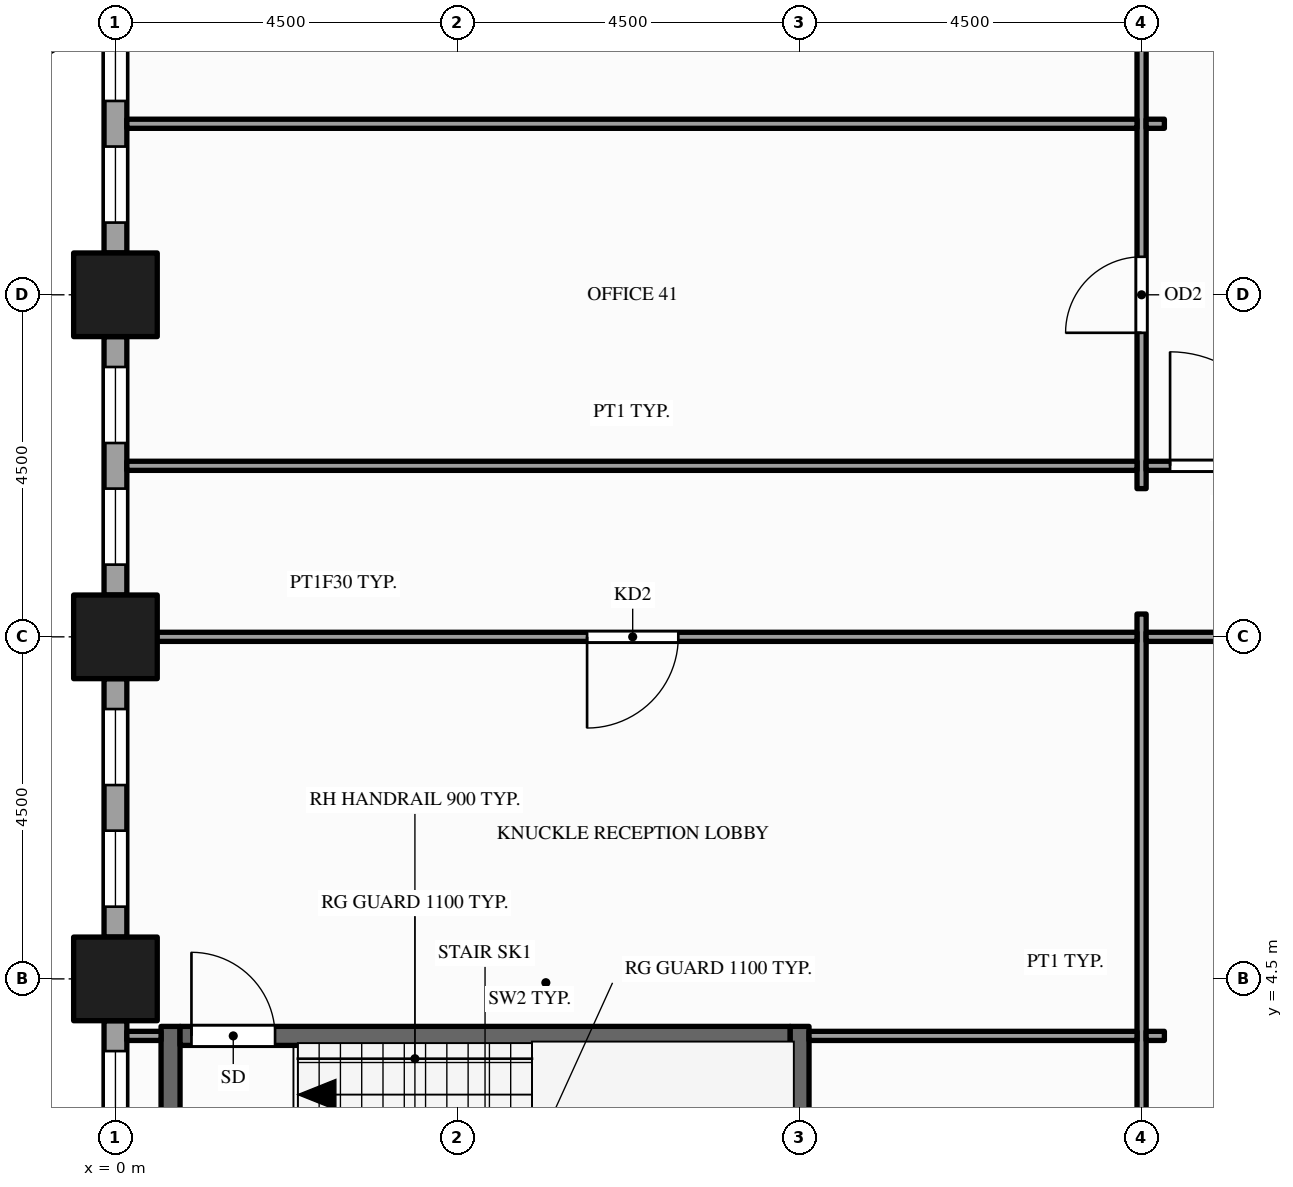
"""IFC4 building model, lengths in metres.
Left out: names, types, materials, properties, quantities, classifications, styles, units other than length and angle.
Written with IfcOpenShell. Run it as: python <this file> out.ifc"""

import sys

from ifc_helpers import new_model, si_unit, direction, frame, frame_2d, origin, origin_2d, place, context, subcontext, project, spatial, rectangle, hollow_rectangle, extrude, element, fill, save


model = new_model("IFC4")
c1 = context("Model", 3, precision=1e-05, world=origin(), true_north=direction((0.0, 1.0)))
c2 = subcontext(c1, "Body", "Model", "MODEL_VIEW")
j1 = project(units=[si_unit("LENGTHUNIT", "METRE"), si_unit("PLANEANGLEUNIT", "RADIAN")], contexts=[c1])
p1 = place(None, origin())
s1 = spatial("IfcSite", under=j1, at=p1, CompositionType="ELEMENT")
p2 = place(p1, origin())
s2 = spatial("IfcBuilding", under=s1, at=p2, CompositionType="ELEMENT")
p3 = place(p2, frame((0.0, 0.0, 61.0)))
s3 = spatial("IfcBuildingStorey", under=s2, at=p3, CompositionType="ELEMENT", Elevation=61.0)
for number, where, z_axis, x_axis in (
    (1, (0.0, 4.5, -0.15), (0.0, 0.0, 1.0), (1.0, 0.0, 0.0)),
    (2, (0.0, 9.0, -0.15), (0.0, 0.0, 1.0), (1.0, 0.0, 0.0)),
    (3, (0.0, 13.5, -0.15), (0.0, 0.0, 1.0), (1.0, 0.0, 0.0)),
):
    element("IfcColumn", number, at=place(p3, frame(where, z_axis=z_axis, x_axis=x_axis)), inside=s3, PredefinedType="COLUMN", context=c2, shape_type="SweptSolid", body=[
        extrude(hollow_rectangle(XDim=1.1, YDim=1.1, WallThickness=0.06, at=origin_2d()), origin(), (0.0, 0.0, 1.0), 4.0),
    ])
p4 = place(p3, frame((0.0, 17.45, 0.0), z_axis=(0.0, 0.0, 1.0), x_axis=(0.0, -1.0, 0.0)))
e4 = element("IfcWall", 4, at=p4, inside=s3, PredefinedType="STANDARD", context=c2, shape_type="SweptSolid", body=[
    extrude(rectangle(XDim=3.4, YDim=0.3, at=frame_2d((1.7, 0.0))), origin(), (0.0, 0.0, 1.0), 3.144),
])
p5 = place(p4, frame((0.4, 0.0, 0.9)))
e5 = element("IfcOpeningElement", 5, at=p5, cuts=e4, PredefinedType="OPENING", context=c2, shape_type="SweptSolid", body=[
    extrude(rectangle(XDim=1.0, YDim=2.0, at=frame_2d((0.5, 1.0))), frame((0.0, 0.16, 0.0), z_axis=(0.0, -1.0, 0.0), x_axis=(1.0, 0.0, 0.0)), (0.0, 0.0, 1.0), 0.32),
])
p6 = place(p4, frame((2.0, 0.0, 0.9)))
e6 = element("IfcOpeningElement", 6, at=p6, cuts=e4, PredefinedType="OPENING", context=c2, shape_type="SweptSolid", body=[
    extrude(rectangle(XDim=1.0, YDim=2.0, at=frame_2d((0.5, 1.0))), frame((0.0, 0.16, 0.0), z_axis=(0.0, -1.0, 0.0), x_axis=(1.0, 0.0, 0.0)), (0.0, 0.0, 1.0), 0.32),
])
p7 = place(p3, frame((0.0, 12.95, 0.0), z_axis=(0.0, 0.0, 1.0), x_axis=(0.0, -1.0, 0.0)))
e7 = element("IfcWall", 7, at=p7, inside=s3, PredefinedType="STANDARD", context=c2, shape_type="SweptSolid", body=[
    extrude(rectangle(XDim=3.4, YDim=0.3, at=frame_2d((1.7, 0.0))), origin(), (0.0, 0.0, 1.0), 3.144),
])
p8 = place(p7, frame((0.4, 0.0, 0.9)))
e8 = element("IfcOpeningElement", 8, at=p8, cuts=e7, PredefinedType="OPENING", context=c2, shape_type="SweptSolid", body=[
    extrude(rectangle(XDim=1.0, YDim=2.0, at=frame_2d((0.5, 1.0))), frame((0.0, 0.16, 0.0), z_axis=(0.0, -1.0, 0.0), x_axis=(1.0, 0.0, 0.0)), (0.0, 0.0, 1.0), 0.32),
])
p9 = place(p7, frame((2.0, 0.0, 0.9)))
e9 = element("IfcOpeningElement", 9, at=p9, cuts=e7, PredefinedType="OPENING", context=c2, shape_type="SweptSolid", body=[
    extrude(rectangle(XDim=1.0, YDim=2.0, at=frame_2d((0.5, 1.0))), frame((0.0, 0.16, 0.0), z_axis=(0.0, -1.0, 0.0), x_axis=(1.0, 0.0, 0.0)), (0.0, 0.0, 1.0), 0.32),
])
p10 = place(p3, frame((0.0, 8.45, 0.0), z_axis=(0.0, 0.0, 1.0), x_axis=(0.0, -1.0, 0.0)))
e10 = element("IfcWall", 10, at=p10, inside=s3, PredefinedType="STANDARD", context=c2, shape_type="SweptSolid", body=[
    extrude(rectangle(XDim=3.4, YDim=0.3, at=frame_2d((1.7, 0.0))), origin(), (0.0, 0.0, 1.0), 3.144),
])
p11 = place(p10, frame((0.4, 0.0, 0.9)))
e11 = element("IfcOpeningElement", 11, at=p11, cuts=e10, PredefinedType="OPENING", context=c2, shape_type="SweptSolid", body=[
    extrude(rectangle(XDim=1.0, YDim=2.0, at=frame_2d((0.5, 1.0))), frame((0.0, 0.16, 0.0), z_axis=(0.0, -1.0, 0.0), x_axis=(1.0, 0.0, 0.0)), (0.0, 0.0, 1.0), 0.32),
])
p12 = place(p10, frame((2.0, 0.0, 0.9)))
e12 = element("IfcOpeningElement", 12, at=p12, cuts=e10, PredefinedType="OPENING", context=c2, shape_type="SweptSolid", body=[
    extrude(rectangle(XDim=1.0, YDim=2.0, at=frame_2d((0.5, 1.0))), frame((0.0, 0.16, 0.0), z_axis=(0.0, -1.0, 0.0), x_axis=(1.0, 0.0, 0.0)), (0.0, 0.0, 1.0), 0.32),
])
p13 = place(p3, frame((0.0, 3.95, 0.0), z_axis=(0.0, 0.0, 1.0), x_axis=(0.0, -1.0, 0.0)))
e13 = element("IfcWall", 13, at=p13, inside=s3, PredefinedType="STANDARD", context=c2, shape_type="SweptSolid", body=[
    extrude(rectangle(XDim=3.4, YDim=0.3, at=frame_2d((1.7, 0.0))), origin(), (0.0, 0.0, 1.0), 3.144),
])
p14 = place(p13, frame((0.4, 0.0, 0.9)))
e14 = element("IfcOpeningElement", 14, at=p14, cuts=e13, PredefinedType="OPENING", context=c2, shape_type="SweptSolid", body=[
    extrude(rectangle(XDim=1.0, YDim=2.0, at=frame_2d((0.5, 1.0))), frame((0.0, 0.16, 0.0), z_axis=(0.0, -1.0, 0.0), x_axis=(1.0, 0.0, 0.0)), (0.0, 0.0, 1.0), 0.32),
])
p15 = place(p13, frame((2.0, 0.0, 0.9)))
e15 = element("IfcOpeningElement", 15, at=p15, cuts=e13, PredefinedType="OPENING", context=c2, shape_type="SweptSolid", body=[
    extrude(rectangle(XDim=1.0, YDim=2.0, at=frame_2d((0.5, 1.0))), frame((0.0, 0.16, 0.0), z_axis=(0.0, -1.0, 0.0), x_axis=(1.0, 0.0, 0.0)), (0.0, 0.0, 1.0), 0.32),
])
p16 = place(p3, frame((0.725, 0.6, 0.0), z_axis=(0.0, 0.0, 1.0), x_axis=(0.0, 1.0, 0.0)))
e16 = element("IfcWall", 16, at=p16, inside=s3, PredefinedType="SHEAR", context=c2, shape_type="SweptSolid", body=[
    extrude(rectangle(XDim=3.275, YDim=0.25, at=frame_2d((1.637, 0.0))), origin(), (0.0, 0.0, 1.0), 3.85),
])
p17 = place(p3, frame((9.0, 0.55, 0.0), z_axis=(0.0, 0.0, 1.0), x_axis=(0.0, 1.0, 0.0)))
e17 = element("IfcWall", 17, at=p17, inside=s3, PredefinedType="SHEAR", context=c2, shape_type="SweptSolid", body=[
    extrude(rectangle(XDim=3.325, YDim=0.25, at=frame_2d((1.663, 0.0))), origin(), (0.0, 0.0, 1.0), 3.85),
])
p18 = place(p3, frame((13.5, 0.15, 0.0), z_axis=(0.0, 0.0, 1.0), x_axis=(0.0, 1.0, 0.0)))
e18 = element("IfcWall", 18, at=p18, inside=s3, PredefinedType="PARTITIONING", context=c2, shape_type="SweptSolid", body=[
    extrude(rectangle(XDim=9.15, YDim=0.12, at=frame_2d((4.575, 0.0))), origin(), (0.0, 0.0, 1.0), 2.938),
])
p19 = place(p3, frame((13.5, 10.95, 0.0), z_axis=(0.0, 0.0, 1.0), x_axis=(0.0, 1.0, 0.0)))
e19 = element("IfcWall", 19, at=p19, inside=s3, PredefinedType="PARTITIONING", context=c2, shape_type="SweptSolid", body=[
    extrude(rectangle(XDim=20.85, YDim=0.12, at=frame_2d((10.425, 0.0))), origin(), (0.0, 0.0, 1.0), 2.6),
])
p20 = place(p19, frame((2.05, 0.0, 0.0)))
e20 = element("IfcOpeningElement", 20, at=p20, cuts=e19, PredefinedType="OPENING", context=c2, shape_type="SweptSolid", body=[
    extrude(rectangle(XDim=1.0, YDim=2.1, at=frame_2d((0.5, 1.05))), frame((0.0, 0.07, 0.0), z_axis=(0.0, -1.0, 0.0), x_axis=(1.0, 0.0, 0.0)), (0.0, 0.0, 1.0), 0.14),
])
p21 = place(p19, frame((6.55, 0.0, 0.0)))
e21 = element("IfcOpeningElement", 21, at=p21, cuts=e19, PredefinedType="OPENING", context=c2, shape_type="SweptSolid", body=[
    extrude(rectangle(XDim=1.0, YDim=2.1, at=frame_2d((0.5, 1.05))), frame((0.0, 0.07, 0.0), z_axis=(0.0, -1.0, 0.0), x_axis=(1.0, 0.0, 0.0)), (0.0, 0.0, 1.0), 0.14),
])
p22 = place(p19, frame((11.805, 0.0, 0.0)))
e22 = element("IfcOpeningElement", 22, at=p22, cuts=e19, PredefinedType="OPENING", context=c2, shape_type="SweptSolid", body=[
    extrude(rectangle(XDim=1.8, YDim=2.1, at=frame_2d((0.9, 1.05))), frame((0.0, 0.07, 0.0), z_axis=(0.0, -1.0, 0.0), x_axis=(1.0, 0.0, 0.0)), (0.0, 0.0, 1.0), 0.14),
])
p23 = place(p3, frame((0.15, 3.75, 0.0), z_axis=(0.0, 0.0, 1.0), x_axis=(1.0, 0.0, 0.0)))
e23 = element("IfcWall", 23, at=p23, inside=s3, PredefinedType="PARTITIONING", context=c2, shape_type="SweptSolid", body=[
    extrude(rectangle(XDim=0.45, YDim=0.12, at=frame_2d((0.225, 0.0))), origin(), (0.0, 0.0, 1.0), 3.144),
])
p24 = place(p3, frame((0.85, 3.75, 0.0), z_axis=(0.0, 0.0, 1.0), x_axis=(1.0, 0.0, 0.0)))
e24 = element("IfcWall", 24, at=p24, inside=s3, PredefinedType="SHEAR", context=c2, shape_type="SweptSolid", body=[
    extrude(rectangle(XDim=8.025, YDim=0.25, at=frame_2d((4.012, 0.0))), origin(), (0.0, 0.0, 1.0), 3.85),
])
p25 = place(p24, frame((0.15, 0.0, 0.0)))
e25 = element("IfcOpeningElement", 25, at=p25, cuts=e24, PredefinedType="OPENING", context=c2, shape_type="SweptSolid", body=[
    extrude(rectangle(XDim=1.1, YDim=2.1, at=frame_2d((0.55, 1.05))), frame((0.0, 0.135, 0.0), z_axis=(0.0, -1.0, 0.0), x_axis=(1.0, 0.0, 0.0)), (0.0, 0.0, 1.0), 0.27),
])
p26 = place(p3, frame((9.125, 3.75, 0.0), z_axis=(0.0, 0.0, 1.0), x_axis=(1.0, 0.0, 0.0)))
e26 = element("IfcWall", 26, at=p26, inside=s3, PredefinedType="PARTITIONING", context=c2, shape_type="SweptSolid", body=[
    extrude(rectangle(XDim=4.315, YDim=0.12, at=frame_2d((2.157, 0.0))), origin(), (0.0, 0.0, 1.0), 2.938),
])
p27 = place(p3, frame((13.56, 3.75, 0.0), z_axis=(0.0, 0.0, 1.0), x_axis=(1.0, 0.0, 0.0)))
e27 = element("IfcWall", 27, at=p27, inside=s3, PredefinedType="PARTITIONING", context=c2, shape_type="SweptSolid", body=[
    extrude(rectangle(XDim=0.24, YDim=0.12, at=frame_2d((0.12, 0.0))), origin(), (0.0, 0.0, 1.0), 2.938),
])
p28 = place(p3, frame((0.15, 9.0, 0.0), z_axis=(0.0, 0.0, 1.0), x_axis=(1.0, 0.0, 0.0)))
e28 = element("IfcWall", 28, at=p28, inside=s3, PredefinedType="PARTITIONING", context=c2, shape_type="SweptSolid", body=[
    extrude(rectangle(XDim=13.29, YDim=0.12, at=frame_2d((6.645, 0.0))), origin(), (0.0, 0.0, 1.0), 2.938),
])
p29 = place(p28, frame((6.055, 0.0, 0.0)))
e29 = element("IfcOpeningElement", 29, at=p29, cuts=e28, PredefinedType="OPENING", context=c2, shape_type="SweptSolid", body=[
    extrude(rectangle(XDim=1.2, YDim=2.1, at=frame_2d((0.6, 1.05))), frame((0.0, 0.07, 0.0), z_axis=(0.0, -1.0, 0.0), x_axis=(1.0, 0.0, 0.0)), (0.0, 0.0, 1.0), 0.14),
])
p30 = place(p3, frame((13.56, 9.0, 0.0), z_axis=(0.0, 0.0, 1.0), x_axis=(1.0, 0.0, 0.0)))
e30 = element("IfcWall", 30, at=p30, inside=s3, PredefinedType="PARTITIONING", context=c2, shape_type="SweptSolid", body=[
    extrude(rectangle(XDim=17.88, YDim=0.12, at=frame_2d((8.94, 0.0))), origin(), (0.0, 0.0, 1.0), 2.938),
])
p31 = place(p30, frame((8.04, 0.0, 0.0)))
e31 = element("IfcOpeningElement", 31, at=p31, cuts=e30, PredefinedType="OPENING", context=c2, shape_type="SweptSolid", body=[
    extrude(rectangle(XDim=1.8, YDim=2.1, at=frame_2d((0.9, 1.05))), frame((0.0, 0.07, 0.0), z_axis=(0.0, -1.0, 0.0), x_axis=(1.0, 0.0, 0.0)), (0.0, 0.0, 1.0), 0.14),
])
p32 = place(p3, frame((0.15, 11.25, 0.0), z_axis=(0.0, 0.0, 1.0), x_axis=(1.0, 0.0, 0.0)))
e32 = element("IfcWall", 32, at=p32, inside=s3, PredefinedType="PARTITIONING", context=c2, shape_type="SweptSolid", body=[
    extrude(rectangle(XDim=13.29, YDim=0.12, at=frame_2d((6.645, 0.0))), origin(), (0.0, 0.0, 1.0), 2.938),
])
p33 = place(p3, frame((13.56, 11.25, 0.0), z_axis=(0.0, 0.0, 1.0), x_axis=(1.0, 0.0, 0.0)))
e33 = element("IfcWall", 33, at=p33, inside=s3, PredefinedType="PARTITIONING", context=c2, shape_type="SweptSolid", body=[
    extrude(rectangle(XDim=2.13, YDim=0.12, at=frame_2d((1.065, 0.0))), origin(), (0.0, 0.0, 1.0), 2.938),
])
p34 = place(p33, frame((0.315, 0.0, 0.0)))
e34 = element("IfcOpeningElement", 34, at=p34, cuts=e33, PredefinedType="OPENING", context=c2, shape_type="SweptSolid", body=[
    extrude(rectangle(XDim=1.5, YDim=2.1, at=frame_2d((0.75, 1.05))), frame((0.0, 0.07, 0.0), z_axis=(0.0, -1.0, 0.0), x_axis=(1.0, 0.0, 0.0)), (0.0, 0.0, 1.0), 0.14),
])
p35 = place(p3, frame((0.15, 15.75, 0.0), z_axis=(0.0, 0.0, 1.0), x_axis=(1.0, 0.0, 0.0)))
e35 = element("IfcWall", 35, at=p35, inside=s3, PredefinedType="PARTITIONING", context=c2, shape_type="SweptSolid", body=[
    extrude(rectangle(XDim=13.29, YDim=0.12, at=frame_2d((6.645, 0.0))), origin(), (0.0, 0.0, 1.0), 2.938),
])
p36 = place(p3, frame((13.56, 15.75, 0.0), z_axis=(0.0, 0.0, 1.0), x_axis=(1.0, 0.0, 0.0)))
e36 = element("IfcWall", 36, at=p36, inside=s3, PredefinedType="PARTITIONING", context=c2, shape_type="SweptSolid", body=[
    extrude(rectangle(XDim=0.24, YDim=0.12, at=frame_2d((0.12, 0.0))), origin(), (0.0, 0.0, 1.0), 2.938),
])
p37 = place(p5, origin())
e37 = element("IfcWindow", 37, at=p37, inside=s3, PartitioningType="SINGLE_PANEL", PredefinedType="WINDOW", context=c2, shape_type="SweptSolid", body=[
    extrude(rectangle(XDim=1.0, YDim=2.0, at=frame_2d((0.5, 1.0))), frame((0.0, 0.03, 0.0), z_axis=(0.0, -1.0, 0.0), x_axis=(1.0, 0.0, 0.0)), (0.0, 0.0, 1.0), 0.06),
])
fill(e5, e37)
p38 = place(p6, origin())
e38 = element("IfcWindow", 38, at=p38, inside=s3, PartitioningType="SINGLE_PANEL", PredefinedType="WINDOW", context=c2, shape_type="SweptSolid", body=[
    extrude(rectangle(XDim=1.0, YDim=2.0, at=frame_2d((0.5, 1.0))), frame((0.0, 0.03, 0.0), z_axis=(0.0, -1.0, 0.0), x_axis=(1.0, 0.0, 0.0)), (0.0, 0.0, 1.0), 0.06),
])
fill(e6, e38)
p39 = place(p8, origin())
e39 = element("IfcWindow", 39, at=p39, inside=s3, PartitioningType="SINGLE_PANEL", PredefinedType="WINDOW", context=c2, shape_type="SweptSolid", body=[
    extrude(rectangle(XDim=1.0, YDim=2.0, at=frame_2d((0.5, 1.0))), frame((0.0, 0.03, 0.0), z_axis=(0.0, -1.0, 0.0), x_axis=(1.0, 0.0, 0.0)), (0.0, 0.0, 1.0), 0.06),
])
fill(e8, e39)
p40 = place(p9, origin())
e40 = element("IfcWindow", 40, at=p40, inside=s3, PartitioningType="SINGLE_PANEL", PredefinedType="WINDOW", context=c2, shape_type="SweptSolid", body=[
    extrude(rectangle(XDim=1.0, YDim=2.0, at=frame_2d((0.5, 1.0))), frame((0.0, 0.03, 0.0), z_axis=(0.0, -1.0, 0.0), x_axis=(1.0, 0.0, 0.0)), (0.0, 0.0, 1.0), 0.06),
])
fill(e9, e40)
p41 = place(p11, origin())
e41 = element("IfcWindow", 41, at=p41, inside=s3, PartitioningType="SINGLE_PANEL", PredefinedType="WINDOW", context=c2, shape_type="SweptSolid", body=[
    extrude(rectangle(XDim=1.0, YDim=2.0, at=frame_2d((0.5, 1.0))), frame((0.0, 0.03, 0.0), z_axis=(0.0, -1.0, 0.0), x_axis=(1.0, 0.0, 0.0)), (0.0, 0.0, 1.0), 0.06),
])
fill(e11, e41)
p42 = place(p12, origin())
e42 = element("IfcWindow", 42, at=p42, inside=s3, PartitioningType="SINGLE_PANEL", PredefinedType="WINDOW", context=c2, shape_type="SweptSolid", body=[
    extrude(rectangle(XDim=1.0, YDim=2.0, at=frame_2d((0.5, 1.0))), frame((0.0, 0.03, 0.0), z_axis=(0.0, -1.0, 0.0), x_axis=(1.0, 0.0, 0.0)), (0.0, 0.0, 1.0), 0.06),
])
fill(e12, e42)
p43 = place(p14, origin())
e43 = element("IfcWindow", 43, at=p43, inside=s3, PartitioningType="SINGLE_PANEL", PredefinedType="WINDOW", context=c2, shape_type="SweptSolid", body=[
    extrude(rectangle(XDim=1.0, YDim=2.0, at=frame_2d((0.5, 1.0))), frame((0.0, 0.03, 0.0), z_axis=(0.0, -1.0, 0.0), x_axis=(1.0, 0.0, 0.0)), (0.0, 0.0, 1.0), 0.06),
])
fill(e14, e43)
p44 = place(p25, origin())
e44 = element("IfcDoor", 44, at=p44, inside=s3, OperationType="SINGLE_SWING_LEFT", PredefinedType="DOOR", context=c2, shape_type="SweptSolid", body=[
    extrude(rectangle(XDim=1.1, YDim=2.1, at=frame_2d((0.55, 1.05))), frame((0.0, 0.025, 0.0), z_axis=(0.0, -1.0, 0.0), x_axis=(1.0, 0.0, 0.0)), (0.0, 0.0, 1.0), 0.05),
])
fill(e25, e44)
p45 = place(p29, origin())
e45 = element("IfcDoor", 45, at=p45, inside=s3, OperationType="SINGLE_SWING_LEFT", PredefinedType="DOOR", context=c2, shape_type="SweptSolid", body=[
    extrude(rectangle(XDim=1.2, YDim=2.1, at=frame_2d((0.6, 1.05))), frame((0.0, 0.025, 0.0), z_axis=(0.0, -1.0, 0.0), x_axis=(1.0, 0.0, 0.0)), (0.0, 0.0, 1.0), 0.05),
])
fill(e29, e45)
p46 = place(p34, origin())
e46 = element("IfcDoor", 46, at=p46, inside=s3, OperationType="SINGLE_SWING_LEFT", PredefinedType="DOOR", context=c2, shape_type="SweptSolid", body=[
    extrude(rectangle(XDim=1.5, YDim=2.1, at=frame_2d((0.75, 1.05))), frame((0.0, 0.025, 0.0), z_axis=(0.0, -1.0, 0.0), x_axis=(1.0, 0.0, 0.0)), (0.0, 0.0, 1.0), 0.05),
])
fill(e34, e46)
p47 = place(p20, origin())
e47 = element("IfcDoor", 47, at=p47, inside=s3, OperationType="SINGLE_SWING_LEFT", PredefinedType="DOOR", context=c2, shape_type="SweptSolid", body=[
    extrude(rectangle(XDim=1.0, YDim=2.1, at=frame_2d((0.5, 1.05))), frame((0.0, 0.025, 0.0), z_axis=(0.0, -1.0, 0.0), x_axis=(1.0, 0.0, 0.0)), (0.0, 0.0, 1.0), 0.05),
])
fill(e20, e47)
save(model, sys.argv[1])
